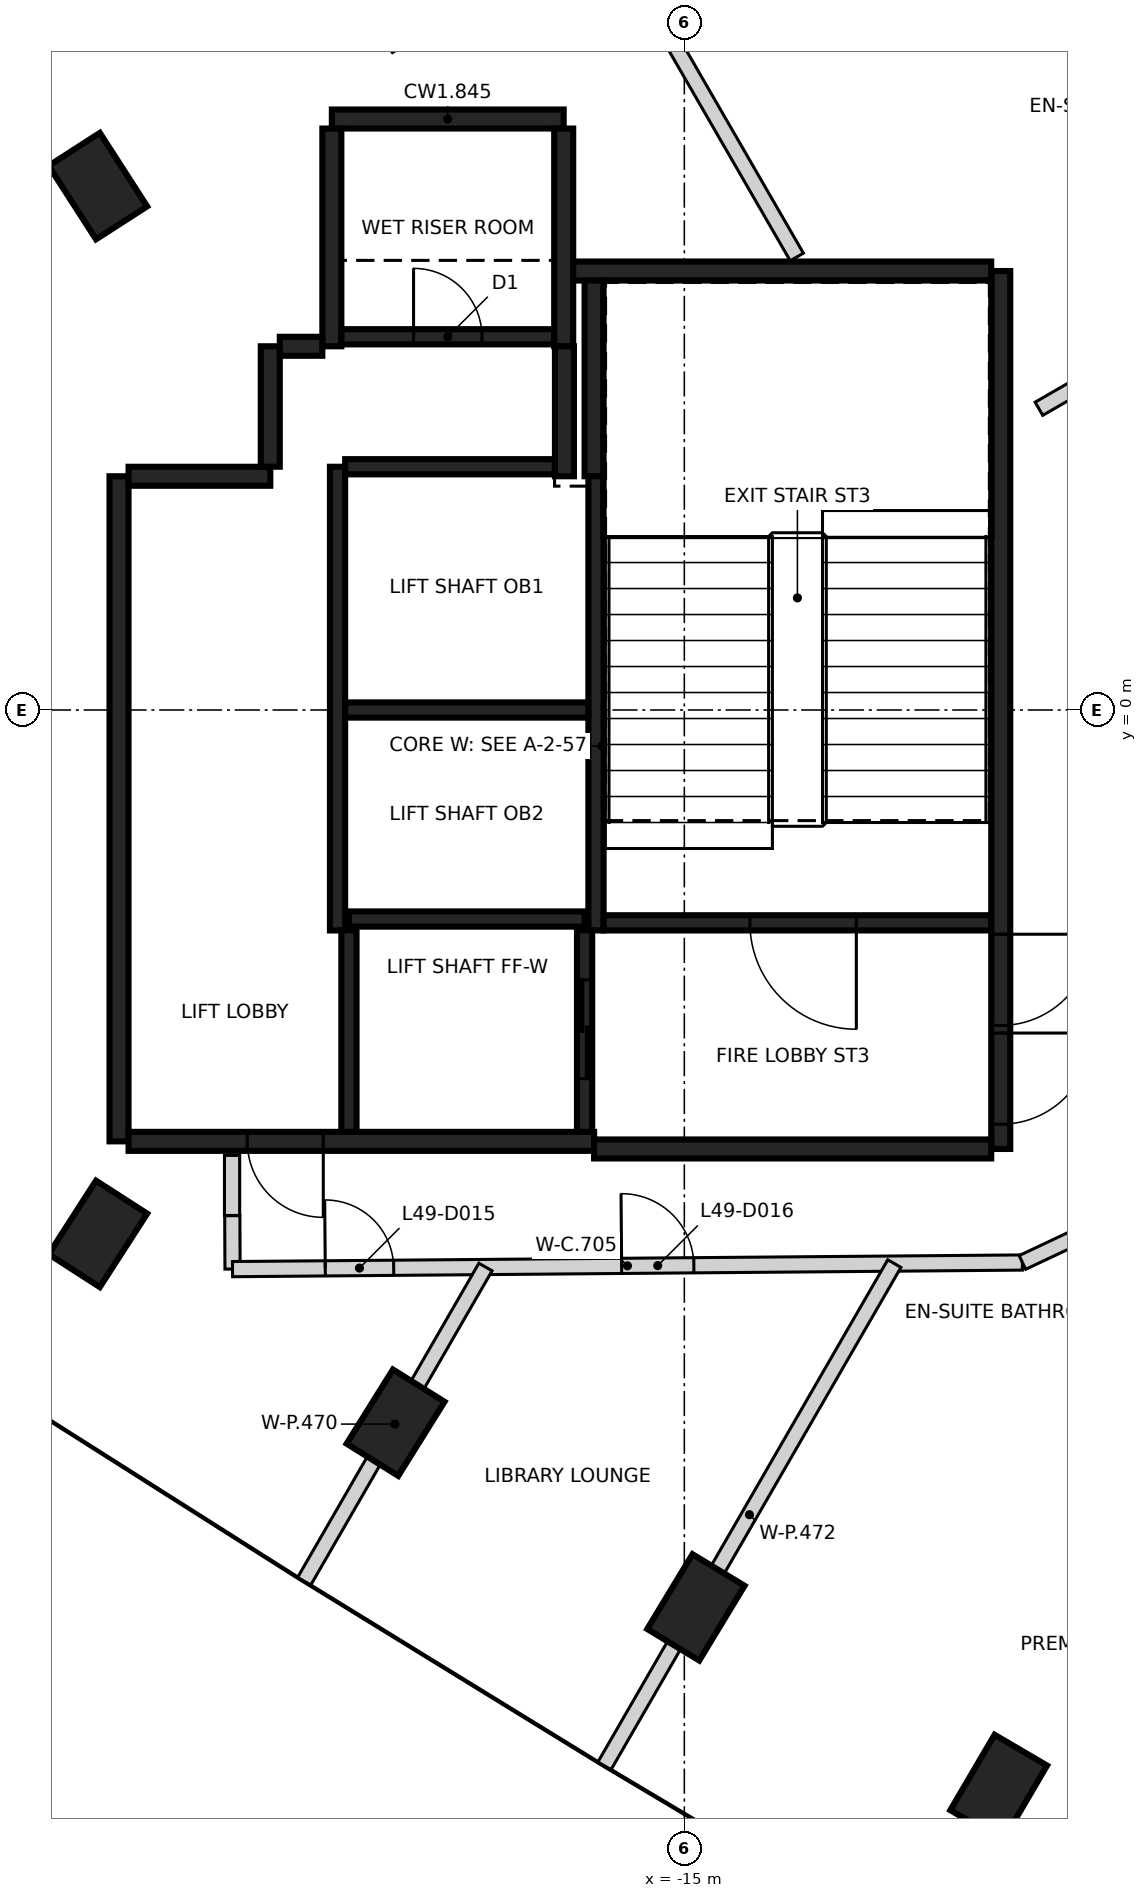
"""IFC4 building model, lengths in metres.
Left out: names, types, materials, properties, quantities, classifications, styles, units other than length and angle.
Written with IfcOpenShell. Run it as: python <this file> out.ifc"""

import sys

from ifc_helpers import new_model, si_unit, direction, frame, frame_2d, origin, origin_2d, place, context, subcontext, project, spatial, rectangle, extrude, element, fill, save


model = new_model("IFC4")
c1 = context("Model", 3, precision=1e-05, world=origin(), true_north=direction((0.0, 1.0)))
c2 = subcontext(c1, "Body", "Model", "MODEL_VIEW")
j1 = project(units=[si_unit("LENGTHUNIT", "METRE"), si_unit("PLANEANGLEUNIT", "RADIAN")], contexts=[c1])
p1 = place(None, origin())
s1 = spatial("IfcSite", under=j1, at=p1, CompositionType="ELEMENT")
p2 = place(p1, origin())
s2 = spatial("IfcBuilding", under=s1, at=p2, CompositionType="ELEMENT")
p3 = place(p2, frame((0.0, 0.0, 197.2)))
s3 = spatial("IfcBuildingStorey", under=s2, at=p3, CompositionType="ELEMENT", Elevation=197.2)
for number, where, z_axis, x_axis in (
    (1, (-22.715, 6.892, -0.35), (0.0, 0.0, 1.0), (-0.541, 0.841, 0.0)),
    (2, (-22.715, -6.892, -0.35), (0.0, 0.0, 1.0), (0.541, 0.841, 0.0)),
    (3, (-18.799, -9.376, -0.35), (0.0, 0.0, 1.0), (0.529, 0.848, 0.0)),
    (4, (-14.848, -11.806, -0.35), (0.0, 0.0, 1.0), (0.518, 0.855, 0.0)),
    (5, (-10.864, -14.18, -0.35), (0.0, 0.0, 1.0), (0.506, 0.862, 0.0)),
):
    element("IfcColumn", number, at=place(p3, frame(where, z_axis=z_axis, x_axis=x_axis)), inside=s3, PredefinedType="COLUMN", context=c2, shape_type="SweptSolid", body=[
        extrude(rectangle(XDim=1.15, YDim=0.8, at=origin_2d()), origin(), (0.0, 0.0, 1.0), 3.6),
    ])
p4 = place(p3, frame((-10.837, 5.775, 0.0), z_axis=(0.0, 0.0, 1.0), x_axis=(0.0, -1.0, 0.0)))
e6 = element("IfcWall", 6, at=p4, inside=s3, PredefinedType="SHEAR", context=c2, shape_type="SweptSolid", body=[
    extrude(rectangle(XDim=11.55, YDim=0.25, at=frame_2d((5.775, 0.0))), origin(), (0.0, 0.0, 1.0), 3.25),
])
p5 = place(p4, frame((10.025, 0.0, 0.0)))
e7 = element("IfcOpeningElement", 7, at=p5, cuts=e6, PredefinedType="OPENING", context=c2, shape_type="SweptSolid", body=[
    extrude(rectangle(XDim=1.2, YDim=2.1, at=frame_2d((0.6, 1.05))), frame((0.0, 0.135, 0.0), z_axis=(0.0, -1.0, 0.0), x_axis=(1.0, 0.0, 0.0)), (0.0, 0.0, 1.0), 0.27),
])
p6 = place(p4, frame((8.725, 0.0, 0.0)))
e8 = element("IfcOpeningElement", 8, at=p6, cuts=e6, PredefinedType="OPENING", context=c2, shape_type="SweptSolid", body=[
    extrude(rectangle(XDim=1.2, YDim=2.1, at=frame_2d((0.6, 1.05))), frame((0.0, 0.135, 0.0), z_axis=(0.0, -1.0, 0.0), x_axis=(1.0, 0.0, 0.0)), (0.0, 0.0, 1.0), 0.27),
])
p7 = place(p3, frame((-22.437, -5.675, 0.0), z_axis=(0.0, 0.0, 1.0), x_axis=(0.0, 1.0, 0.0)))
e9 = element("IfcWall", 9, at=p7, inside=s3, PredefinedType="SHEAR", context=c2, shape_type="SweptSolid", body=[
    extrude(rectangle(XDim=8.75, YDim=0.25, at=frame_2d((4.375, 0.0))), origin(), (0.0, 0.0, 1.0), 3.25),
])
p8 = place(p3, frame((-16.187, -5.675, 0.0), z_axis=(0.0, 0.0, 1.0), x_axis=(-1.0, 0.0, 0.0)))
e10 = element("IfcWall", 10, at=p8, inside=s3, PredefinedType="SHEAR", context=c2, shape_type="SweptSolid", body=[
    extrude(rectangle(XDim=6.125, YDim=0.25, at=frame_2d((3.062, 0.0))), origin(), (0.0, 0.0, 1.0), 3.25),
])
p9 = place(p8, frame((3.563, 0.0, 0.0)))
e11 = element("IfcOpeningElement", 11, at=p9, cuts=e10, PredefinedType="OPENING", context=c2, shape_type="SweptSolid", body=[
    extrude(rectangle(XDim=1.0, YDim=2.1, at=frame_2d((0.5, 1.05))), frame((0.0, 0.135, 0.0), z_axis=(0.0, -1.0, 0.0), x_axis=(1.0, 0.0, 0.0)), (0.0, 0.0, 1.0), 0.27),
])
p10 = place(p3, frame((-10.963, -5.775, 0.0), z_axis=(0.0, 0.0, 1.0), x_axis=(-1.0, 0.0, 0.0)))
e12 = element("IfcWall", 12, at=p10, inside=s3, PredefinedType="SHEAR", context=c2, shape_type="SweptSolid", body=[
    extrude(rectangle(XDim=5.225, YDim=0.25, at=frame_2d((2.612, 0.0))), origin(), (0.0, 0.0, 1.0), 3.25),
])
p11 = place(p3, frame((-16.472, 5.775, 0.0), z_axis=(0.0, 0.0, 1.0), x_axis=(1.0, 0.0, 0.0)))
e13 = element("IfcWall", 13, at=p11, inside=s3, PredefinedType="SHEAR", context=c2, shape_type="SweptSolid", body=[
    extrude(rectangle(XDim=5.51, YDim=0.25, at=frame_2d((2.755, 0.0))), origin(), (0.0, 0.0, 1.0), 3.25),
])
p12 = place(p3, frame((-19.637, 7.775, 0.0), z_axis=(0.0, 0.0, 1.0), x_axis=(1.0, 0.0, 0.0)))
e14 = element("IfcWall", 14, at=p12, inside=s3, PredefinedType="SHEAR", context=c2, shape_type="SweptSolid", body=[
    extrude(rectangle(XDim=3.05, YDim=0.25, at=frame_2d((1.525, 0.0))), origin(), (0.0, 0.0, 1.0), 3.25),
])
for number, where, z_axis, x_axis in (
    (15, (-16.587, 7.65, 0.0), (0.0, 0.0, 1.0), (0.0, -1.0, 0.0)),
    (16, (-19.637, 4.785, 0.0), (0.0, 0.0, 1.0), (0.0, 1.0, 0.0)),
):
    element("IfcWall", number, at=place(p3, frame(where, z_axis=z_axis, x_axis=x_axis)), inside=s3, PredefinedType="SHEAR", context=c2, shape_type="SweptSolid", body=[
        extrude(rectangle(XDim=2.865, YDim=0.25, at=frame_2d((1.432, 0.0))), origin(), (0.0, 0.0, 1.0), 3.25),
    ])
p13 = place(p3, frame((-16.187, 3.075, 0.0), z_axis=(0.0, 0.0, 1.0), x_axis=(0.0, 1.0, 0.0)))
e17 = element("IfcWall", 17, at=p13, inside=s3, PredefinedType="SHEAR", context=c2, shape_type="SweptSolid", body=[
    extrude(rectangle(XDim=2.575, YDim=0.25, at=frame_2d((1.287, 0.0))), origin(), (0.0, 0.0, 1.0), 3.25),
])
p14 = place(p3, frame((-22.312, 3.075, 0.0), z_axis=(0.0, 0.0, 1.0), x_axis=(1.0, 0.0, 0.0)))
e18 = element("IfcWall", 18, at=p14, inside=s3, PredefinedType="SHEAR", context=c2, shape_type="SweptSolid", body=[
    extrude(rectangle(XDim=1.865, YDim=0.25, at=frame_2d((0.932, 0.0))), origin(), (0.0, 0.0, 1.0), 3.25),
])
p15 = place(p3, frame((-16.577, 4.785, 0.0), z_axis=(0.0, 0.0, 1.0), x_axis=(0.0, -1.0, 0.0)))
e19 = element("IfcWall", 19, at=p15, inside=s3, PredefinedType="SHEAR", context=c2, shape_type="SweptSolid", body=[
    extrude(rectangle(XDim=1.71, YDim=0.25, at=frame_2d((0.855, 0.0))), origin(), (0.0, 0.0, 1.0), 3.25),
])
p16 = place(p3, frame((-20.447, 3.2, 0.0), z_axis=(0.0, 0.0, 1.0), x_axis=(0.0, 1.0, 0.0)))
e20 = element("IfcWall", 20, at=p16, inside=s3, PredefinedType="SHEAR", context=c2, shape_type="SweptSolid", body=[
    extrude(rectangle(XDim=1.584, YDim=0.25, at=frame_2d((0.792, 0.0))), origin(), (0.0, 0.0, 1.0), 3.25),
])
p17 = place(p3, frame((-20.322, 4.785, 0.0), z_axis=(0.0, 0.0, 1.0), x_axis=(1.0, 0.0, 0.0)))
e21 = element("IfcWall", 21, at=p17, inside=s3, PredefinedType="SHEAR", context=c2, shape_type="SweptSolid", body=[
    extrude(rectangle(XDim=0.559, YDim=0.25, at=frame_2d((0.28, 0.0))), origin(), (0.0, 0.0, 1.0), 3.25),
])
p18 = place(p3, frame((-16.162, 3.074, 0.0), z_axis=(0.0, 0.0, 1.0), x_axis=(0.0, -1.0, 0.0)))
e22 = element("IfcWall", 22, at=p18, inside=s3, PredefinedType="SHEAR", context=c2, shape_type="SweptSolid", body=[
    extrude(rectangle(XDim=5.974, YDim=0.2, at=frame_2d((2.987, 0.0))), origin(), (0.0, 0.0, 1.0), 3.25),
])
p19 = place(p3, frame((-19.562, -2.9, 0.0), z_axis=(0.0, 0.0, 1.0), x_axis=(0.0, 1.0, 0.0)))
e23 = element("IfcWall", 23, at=p19, inside=s3, PredefinedType="SHEAR", context=c2, shape_type="SweptSolid", body=[
    extrude(rectangle(XDim=6.1, YDim=0.2, at=frame_2d((3.05, 0.0))), origin(), (0.0, 0.0, 1.0), 3.25),
])
p20 = place(p3, frame((-10.963, -2.8, 0.0), z_axis=(0.0, 0.0, 1.0), x_axis=(-1.0, 0.0, 0.0)))
e24 = element("IfcWall", 24, at=p20, inside=s3, PredefinedType="SHEAR", context=c2, shape_type="SweptSolid", body=[
    extrude(rectangle(XDim=5.098, YDim=0.2, at=frame_2d((2.549, 0.0))), origin(), (0.0, 0.0, 1.0), 3.25),
])
p21 = place(p20, frame((1.774, 0.0, 0.0)))
e25 = element("IfcOpeningElement", 25, at=p21, cuts=e24, PredefinedType="OPENING", context=c2, shape_type="SweptSolid", body=[
    extrude(rectangle(XDim=1.4, YDim=2.1, at=frame_2d((0.7, 1.05))), frame((0.0, 0.11, 0.0), z_axis=(0.0, -1.0, 0.0), x_axis=(1.0, 0.0, 0.0)), (0.0, 0.0, 1.0), 0.22),
])
p22 = place(p3, frame((-16.263, 0.0, 0.0), z_axis=(0.0, 0.0, 1.0), x_axis=(-1.0, 0.0, 0.0)))
e26 = element("IfcWall", 26, at=p22, inside=s3, PredefinedType="SHEAR", context=c2, shape_type="SweptSolid", body=[
    extrude(rectangle(XDim=3.198, YDim=0.2, at=frame_2d((1.599, 0.0))), origin(), (0.0, 0.0, 1.0), 3.25),
])
p23 = place(p3, frame((-19.511, 4.91, 0.0), z_axis=(0.0, 0.0, 1.0), x_axis=(1.0, 0.0, 0.0)))
e27 = element("IfcWall", 27, at=p23, inside=s3, PredefinedType="SHEAR", context=c2, shape_type="SweptSolid", body=[
    extrude(rectangle(XDim=2.798, YDim=0.2, at=frame_2d((1.399, 0.0))), origin(), (0.0, 0.0, 1.0), 3.25),
])
p24 = place(p23, frame((0.949, 0.0, 0.0)))
e28 = element("IfcOpeningElement", 28, at=p24, cuts=e27, PredefinedType="OPENING", context=c2, shape_type="SweptSolid", body=[
    extrude(rectangle(XDim=0.9, YDim=2.1, at=frame_2d((0.45, 1.05))), frame((0.0, 0.11, 0.0), z_axis=(0.0, -1.0, 0.0), x_axis=(1.0, 0.0, 0.0)), (0.0, 0.0, 1.0), 0.22),
])
p25 = place(p3, frame((-19.462, 3.2, 0.0), z_axis=(0.0, 0.0, 1.0), x_axis=(1.0, 0.0, 0.0)))
e29 = element("IfcWall", 29, at=p25, inside=s3, PredefinedType="SHEAR", context=c2, shape_type="SweptSolid", body=[
    extrude(rectangle(XDim=2.759, YDim=0.2, at=frame_2d((1.379, 0.0))), origin(), (0.0, 0.0, 1.0), 3.25),
])
p26 = place(p3, frame((-19.412, -2.75, 0.0), z_axis=(0.0, 0.0, 1.0), x_axis=(1.0, 0.0, 0.0)))
e30 = element("IfcWall", 30, at=p26, inside=s3, PredefinedType="SHEAR", context=c2, shape_type="SweptSolid", body=[
    extrude(rectangle(XDim=3.1, YDim=0.2, at=frame_2d((1.55, 0.0))), origin(), (0.0, 0.0, 1.0), 3.25),
])
p27 = place(p3, frame((-16.312, -2.898, 0.0), z_axis=(0.0, 0.0, 1.0), x_axis=(0.0, -1.0, 0.0)))
e31 = element("IfcWall", 31, at=p27, inside=s3, PredefinedType="SHEAR", context=c2, shape_type="SweptSolid", body=[
    extrude(rectangle(XDim=2.651, YDim=0.2, at=frame_2d((1.325, 0.0))), origin(), (0.0, 0.0, 1.0), 3.25),
])
p28 = place(p27, frame((0.652, 0.0, 0.0)))
e32 = element("IfcOpeningElement", 32, at=p28, cuts=e31, PredefinedType="OPENING", context=c2, shape_type="SweptSolid", body=[
    extrude(rectangle(XDim=1.3, YDim=2.1, at=frame_2d((0.65, 1.05))), frame((0.0, 0.11, 0.0), z_axis=(0.0, -1.0, 0.0), x_axis=(1.0, 0.0, 0.0)), (0.0, 0.0, 1.0), 0.22),
])
p29 = place(p3, frame((-19.412, -5.549, 0.0), z_axis=(0.0, 0.0, 1.0), x_axis=(0.0, 1.0, 0.0)))
e33 = element("IfcWall", 33, at=p29, inside=s3, PredefinedType="SHEAR", context=c2, shape_type="SweptSolid", body=[
    extrude(rectangle(XDim=2.651, YDim=0.2, at=frame_2d((1.325, 0.0))), origin(), (0.0, 0.0, 1.0), 3.25),
])
p30 = place(p3, frame((-20.95, -6.65, 0.0), z_axis=(0.0, 0.0, 1.0), x_axis=(0.0, 1.0, 0.0)))
e34 = element("IfcWall", 34, at=p30, inside=s3, PredefinedType="PARTITIONING", context=c2, shape_type="SweptSolid", body=[
    extrude(rectangle(XDim=0.79, YDim=0.2, at=frame_2d((0.395, 0.0))), origin(), (0.0, 0.0, 1.0), 3.25),
])
p31 = place(p3, frame((-20.947, -6.653, 0.0), z_axis=(0.0, 0.0, 1.0), x_axis=(0.004173876686, -0.999991289339, 0.0)))
e35 = element("IfcWall", 35, at=p31, inside=s3, PredefinedType="PARTITIONING", context=c2, shape_type="SweptSolid", body=[
    extrude(rectangle(XDim=0.702, YDim=0.2, at=frame_2d((0.351, 0.0))), origin(), (0.0, 0.0, 1.0), 3.25),
])
p32 = place(p3, frame((-20.944, -7.356, 0.0), z_axis=(0.0, 0.0, 1.0), x_axis=(0.999964824566, 0.00838746869, 0.0)))
e36 = element("IfcWall", 36, at=p32, inside=s3, PredefinedType="PARTITIONING", context=c2, shape_type="SweptSolid", body=[
    extrude(rectangle(XDim=10.391, YDim=0.2, at=frame_2d((5.196, 0.0))), origin(), (0.0, 0.0, 1.0), 3.25),
])
p33 = place(p32, frame((1.22, 0.0, 0.0)))
e37 = element("IfcOpeningElement", 37, at=p33, cuts=e36, PredefinedType="OPENING", context=c2, shape_type="SweptSolid", body=[
    extrude(rectangle(XDim=0.9, YDim=2.1, at=frame_2d((0.45, 1.05))), frame((0.0, 0.11, 0.0), z_axis=(0.0, -1.0, 0.0), x_axis=(1.0, 0.0, 0.0)), (0.0, 0.0, 1.0), 0.22),
])
p34 = place(p32, frame((5.119, 0.0, 0.0)))
e38 = element("IfcOpeningElement", 38, at=p34, cuts=e36, PredefinedType="OPENING", context=c2, shape_type="SweptSolid", body=[
    extrude(rectangle(XDim=0.95, YDim=2.1, at=frame_2d((0.475, 1.05))), frame((0.0, 0.11, 0.0), z_axis=(0.0, -1.0, 0.0), x_axis=(1.0, 0.0, 0.0)), (0.0, 0.0, 1.0), 0.22),
])
p35 = place(p3, frame((-10.552, -7.268, 0.0), z_axis=(0.0, 0.0, 1.0), x_axis=(0.904331815333, 0.426830139255, 0.0)))
e39 = element("IfcWall", 39, at=p35, inside=s3, PredefinedType="PARTITIONING", context=c2, shape_type="SweptSolid", body=[
    extrude(rectangle(XDim=0.944, YDim=0.2, at=frame_2d((0.472, 0.0))), origin(), (0.0, 0.0, 1.0), 3.25),
])
p36 = place(p3, frame((-10.334, 3.963, 0.0), z_axis=(0.0, 0.0, 1.0), x_axis=(0.866013159114, 0.500021207791, 0.0)))
e40 = element("IfcWall", 40, at=p36, inside=s3, PredefinedType="PARTITIONING", context=c2, shape_type="SweptSolid", body=[
    extrude(rectangle(XDim=11.931, YDim=0.2, at=frame_2d((5.966, 0.0))), origin(), (0.0, 0.0, 1.0), 3.25),
])
p37 = place(p36, frame((10.103, 0.0, 0.0)))
e41 = element("IfcOpeningElement", 41, at=p37, cuts=e40, PredefinedType="OPENING", context=c2, shape_type="SweptSolid", body=[
    extrude(rectangle(XDim=1.0, YDim=2.1, at=frame_2d((0.5, 1.05))), frame((0.0, 0.11, 0.0), z_axis=(0.0, -1.0, 0.0), x_axis=(1.0, 0.0, 0.0)), (0.0, 0.0, 1.0), 0.22),
])
p38 = place(p36, frame((8.149, 0.0, 0.0)))
e42 = element("IfcOpeningElement", 42, at=p38, cuts=e40, PredefinedType="OPENING", context=c2, shape_type="SweptSolid", body=[
    extrude(rectangle(XDim=0.95, YDim=2.1, at=frame_2d((0.475, 1.05))), frame((0.0, 0.11, 0.0), z_axis=(0.0, -1.0, 0.0), x_axis=(1.0, 0.0, 0.0)), (0.0, 0.0, 1.0), 0.22),
])
p39 = place(p36, frame((1.831, 0.0, 0.0)))
e43 = element("IfcOpeningElement", 43, at=p39, cuts=e40, PredefinedType="OPENING", context=c2, shape_type="SweptSolid", body=[
    extrude(rectangle(XDim=1.0, YDim=2.1, at=frame_2d((0.5, 1.05))), frame((0.0, 0.11, 0.0), z_axis=(0.0, -1.0, 0.0), x_axis=(1.0, 0.0, 0.0)), (0.0, 0.0, 1.0), 0.22),
])
p40 = place(p3, frame((-20.001, -11.461, 0.0), z_axis=(0.0, 0.0, 1.0), x_axis=(0.499749027893, 0.866170254119, 0.0)))
e44 = element("IfcWall", 44, at=p40, inside=s3, PredefinedType="PARTITIONING", context=c2, shape_type="SweptSolid", body=[
    extrude(rectangle(XDim=4.772, YDim=0.2, at=frame_2d((2.386, 0.0))), origin(), (0.0, 0.0, 1.0), 3.25),
])
p41 = place(p3, frame((-17.562, 12.961, 0.0), z_axis=(0.0, 0.0, 1.0), x_axis=(0.500056194816, -0.865992957262, 0.0)))
e45 = element("IfcWall", 45, at=p41, inside=s3, PredefinedType="PARTITIONING", context=c2, shape_type="SweptSolid", body=[
    extrude(rectangle(XDim=8.084, YDim=0.2, at=frame_2d((4.042, 0.0))), origin(), (0.0, 0.0, 1.0), 2.35),
])
p42 = place(p3, frame((-16.05, -13.89, 0.0), z_axis=(0.0, 0.0, 1.0), x_axis=(0.499849898665, 0.866112047488, 0.0)))
e46 = element("IfcWall", 46, at=p42, inside=s3, PredefinedType="PARTITIONING", context=c2, shape_type="SweptSolid", body=[
    extrude(rectangle(XDim=7.628, YDim=0.2, at=frame_2d((3.814, 0.0))), origin(), (0.0, 0.0, 1.0), 3.25),
])
p43 = place(p3, frame((-12.067, 16.263, 0.0), z_axis=(0.0, 0.0, 1.0), x_axis=(0.499975646431, -0.866039463868, 0.0)))
e47 = element("IfcWall", 47, at=p43, inside=s3, PredefinedType="PARTITIONING", context=c2, shape_type="SweptSolid", body=[
    extrude(rectangle(XDim=11.519, YDim=0.2, at=frame_2d((5.759, 0.0))), origin(), (0.0, 0.0, 1.0), 3.25),
])
p44 = place(p28, origin())
e48 = element("IfcDoor", 48, at=p44, inside=s3, OperationType="SLIDING_TO_RIGHT", PredefinedType="DOOR", context=c2, shape_type="SweptSolid", body=[
    extrude(rectangle(XDim=1.3, YDim=2.1, at=frame_2d((0.65, 1.05))), frame((0.0, 0.025, 0.0), z_axis=(0.0, -1.0, 0.0), x_axis=(1.0, 0.0, 0.0)), (0.0, 0.0, 1.0), 0.05),
])
fill(e32, e48)
p45 = place(p9, origin())
e49 = element("IfcDoor", 49, at=p45, inside=s3, OperationType="SINGLE_SWING_LEFT", PredefinedType="DOOR", context=c2, shape_type="SweptSolid", body=[
    extrude(rectangle(XDim=1.0, YDim=2.1, at=frame_2d((0.5, 1.05))), frame((0.0, 0.025, 0.0), z_axis=(0.0, -1.0, 0.0), x_axis=(1.0, 0.0, 0.0)), (0.0, 0.0, 1.0), 0.05),
])
fill(e11, e49)
p46 = place(p5, origin())
e50 = element("IfcDoor", 50, at=p46, inside=s3, OperationType="SINGLE_SWING_LEFT", PredefinedType="DOOR", context=c2, shape_type="SweptSolid", body=[
    extrude(rectangle(XDim=1.2, YDim=2.1, at=frame_2d((0.6, 1.05))), frame((0.0, 0.025, 0.0), z_axis=(0.0, -1.0, 0.0), x_axis=(1.0, 0.0, 0.0)), (0.0, 0.0, 1.0), 0.05),
])
fill(e7, e50)
p47 = place(p6, origin())
e51 = element("IfcDoor", 51, at=p47, inside=s3, OperationType="SINGLE_SWING_RIGHT", PredefinedType="DOOR", context=c2, shape_type="SweptSolid", body=[
    extrude(rectangle(XDim=1.2, YDim=2.1, at=frame_2d((0.6, 1.05))), frame((0.0, 0.025, 0.0), z_axis=(0.0, -1.0, 0.0), x_axis=(1.0, 0.0, 0.0)), (0.0, 0.0, 1.0), 0.05),
])
fill(e8, e51)
p48 = place(p21, origin())
e52 = element("IfcDoor", 52, at=p48, inside=s3, OperationType="SINGLE_SWING_RIGHT", PredefinedType="DOOR", context=c2, shape_type="SweptSolid", body=[
    extrude(rectangle(XDim=1.4, YDim=2.1, at=frame_2d((0.7, 1.05))), frame((0.0, 0.025, 0.0), z_axis=(0.0, -1.0, 0.0), x_axis=(1.0, 0.0, 0.0)), (0.0, 0.0, 1.0), 0.05),
])
fill(e25, e52)
p49 = place(p24, origin())
e53 = element("IfcDoor", 53, at=p49, inside=s3, OperationType="SINGLE_SWING_LEFT", PredefinedType="DOOR", context=c2, shape_type="SweptSolid", body=[
    extrude(rectangle(XDim=0.9, YDim=2.1, at=frame_2d((0.45, 1.05))), frame((0.0, 0.025, 0.0), z_axis=(0.0, -1.0, 0.0), x_axis=(1.0, 0.0, 0.0)), (0.0, 0.0, 1.0), 0.05),
])
fill(e28, e53)
p50 = place(p33, origin())
e54 = element("IfcDoor", 54, at=p50, inside=s3, OperationType="SINGLE_SWING_LEFT", PredefinedType="DOOR", context=c2, shape_type="SweptSolid", body=[
    extrude(rectangle(XDim=0.9, YDim=2.1, at=frame_2d((0.45, 1.05))), frame((0.0, 0.025, 0.0), z_axis=(0.0, -1.0, 0.0), x_axis=(1.0, 0.0, 0.0)), (0.0, 0.0, 1.0), 0.05),
])
fill(e37, e54)
p51 = place(p34, frame((0.95, 0.0, 0.0), z_axis=(0.0, 0.0, 1.0), x_axis=(-1.0, 0.0, 0.0)))
e55 = element("IfcDoor", 55, at=p51, inside=s3, OperationType="SINGLE_SWING_LEFT", PredefinedType="DOOR", context=c2, shape_type="SweptSolid", body=[
    extrude(rectangle(XDim=0.95, YDim=2.1, at=frame_2d((0.475, 1.05))), frame((0.0, 0.025, 0.0), z_axis=(0.0, -1.0, 0.0), x_axis=(1.0, 0.0, 0.0)), (0.0, 0.0, 1.0), 0.05),
])
fill(e38, e55)
save(model, sys.argv[1])
